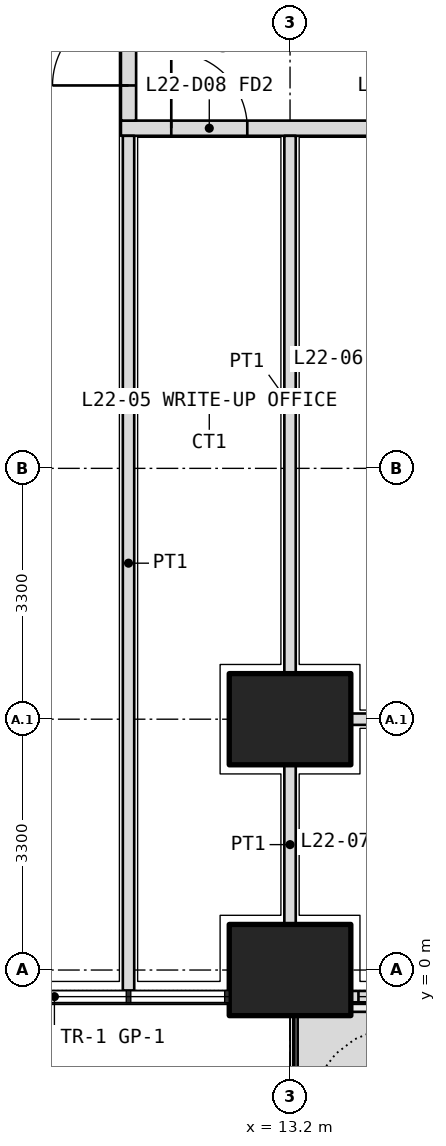
"""IFC4 building model, lengths in metres.
Left out: names, types, materials, properties, quantities, classifications, styles, units other than length and angle.
Written with IfcOpenShell. Run it as: python <this file> out.ifc"""

import sys

from ifc_helpers import new_model, si_unit, direction, frame, frame_2d, origin, origin_2d, place, context, subcontext, project, spatial, polyline, rectangle, outline, extrude, element, fill, save


model = new_model("IFC4")
c1 = context("Model", 3, precision=1e-05, world=origin(), true_north=direction((0.0, 1.0)))
c2 = subcontext(c1, "Body", "Model", "MODEL_VIEW")
j1 = project(units=[si_unit("LENGTHUNIT", "METRE"), si_unit("PLANEANGLEUNIT", "RADIAN")], contexts=[c1])
p1 = place(None, origin())
s1 = spatial("IfcSite", under=j1, at=p1, CompositionType="ELEMENT")
p2 = place(p1, origin())
s2 = spatial("IfcBuilding", under=s1, at=p2, CompositionType="ELEMENT")
p3 = place(p2, frame((0.0, 0.0, 99.0)))
s3 = spatial("IfcBuildingStorey", under=s2, at=p3, CompositionType="ELEMENT", Elevation=99.0)
for number, where, z_axis, x_axis in (
    (1, (13.2, 0.0, 0.0), (0.0, 0.0, 1.0), (1.0, 0.0, 0.0)),
    (2, (13.2, 3.3, 0.0), (0.0, 0.0, 1.0), (1.0, 0.0, 0.0)),
):
    element("IfcColumn", number, at=place(p3, frame(where, z_axis=z_axis, x_axis=x_axis)), inside=s3, PredefinedType="COLUMN", context=c2, shape_type="SweptSolid", body=[
        extrude(rectangle(XDim=1.6, YDim=1.2, at=origin_2d()), origin(), (0.0, 0.0, 1.0), 4.2),
    ])
p4 = place(p3, origin())
e3 = element("IfcWall", 3, at=p4, inside=s3, PredefinedType="USERDEFINED", context=c2, shape_type="SweptSolid", body=[
    extrude(outline(polyline([(13.3, -1.55), (15.75, -1.55), (15.75, -0.55), (13.3, -0.55), (13.3, -1.55)]), holes=[polyline([(13.45, -1.4), (15.6, -1.4), (15.6, -0.7), (13.45, -0.7), (13.45, -1.4)])]), origin(), (0.0, 0.0, 1.0), 1.05),
])
p5 = place(p3, frame((14.0, -0.35, 0.0), z_axis=(0.0, 0.0, 1.0), x_axis=(1.0, 0.0, 0.0)))
e4 = element("IfcWall", 4, at=p5, inside=s3, PredefinedType="SOLIDWALL", context=c2, shape_type="SweptSolid", body=[
    extrude(rectangle(XDim=5.0, YDim=0.15, at=frame_2d((2.5, 0.0))), origin(), (0.0, 0.0, 1.0), 2.7),
])
p6 = place(p5, frame((2.75, 0.0, 0.0)))
e5 = element("IfcOpeningElement", 5, at=p6, cuts=e4, PredefinedType="OPENING", context=c2, shape_type="SweptSolid", body=[
    extrude(rectangle(XDim=1.0, YDim=2.4, at=frame_2d((0.5, 1.2))), frame((0.0, 0.085, 0.0), z_axis=(0.0, -1.0, 0.0), x_axis=(1.0, 0.0, 0.0)), (0.0, 0.0, 1.0), 0.17),
])
p7 = place(p5, frame((0.1, 0.0, 0.1)))
e6 = element("IfcOpeningElement", 6, at=p7, cuts=e4, PredefinedType="OPENING", context=c2, shape_type="SweptSolid", body=[
    extrude(rectangle(XDim=2.15, YDim=2.3, at=frame_2d((1.075, 1.15))), frame((0.0, 0.085, 0.0), z_axis=(0.0, -1.0, 0.0), x_axis=(1.0, 0.0, 0.0)), (0.0, 0.0, 1.0), 0.17),
])
p8 = place(p5, frame((3.85, 0.0, 0.1)))
e7 = element("IfcOpeningElement", 7, at=p8, cuts=e4, PredefinedType="OPENING", context=c2, shape_type="SweptSolid", body=[
    extrude(rectangle(XDim=1.05, YDim=2.3, at=frame_2d((0.525, 1.15))), frame((0.0, 0.085, 0.0), z_axis=(0.0, -1.0, 0.0), x_axis=(1.0, 0.0, 0.0)), (0.0, 0.0, 1.0), 0.17),
])
p9 = place(p3, frame((10.975, 11.075, 0.0), z_axis=(0.0, 0.0, 1.0), x_axis=(1.0, 0.0, 0.0)))
e8 = element("IfcWall", 8, at=p9, inside=s3, PredefinedType="PARTITIONING", context=c2, shape_type="SweptSolid", body=[
    extrude(rectangle(XDim=30.85, YDim=0.2, at=frame_2d((15.425, 0.0))), origin(), (0.0, 0.0, 1.0), 2.85),
])
p10 = place(p9, frame((0.663, 0.0, 0.0)))
e9 = element("IfcOpeningElement", 9, at=p10, cuts=e8, PredefinedType="OPENING", context=c2, shape_type="SweptSolid", body=[
    extrude(rectangle(XDim=1.0, YDim=2.1, at=frame_2d((0.5, 1.05))), frame((0.0, 0.11, 0.0), z_axis=(0.0, -1.0, 0.0), x_axis=(1.0, 0.0, 0.0)), (0.0, 0.0, 1.0), 0.22),
])
p11 = place(p9, frame((3.275, 0.0, 0.0)))
e10 = element("IfcOpeningElement", 10, at=p11, cuts=e8, PredefinedType="OPENING", context=c2, shape_type="SweptSolid", body=[
    extrude(rectangle(XDim=1.2, YDim=2.1, at=frame_2d((0.6, 1.05))), frame((0.0, 0.11, 0.0), z_axis=(0.0, -1.0, 0.0), x_axis=(1.0, 0.0, 0.0)), (0.0, 0.0, 1.0), 0.22),
])
p12 = place(p9, frame((8.325, 0.0, 0.0)))
e11 = element("IfcOpeningElement", 11, at=p12, cuts=e8, PredefinedType="OPENING", context=c2, shape_type="SweptSolid", body=[
    extrude(rectangle(XDim=1.0, YDim=2.1, at=frame_2d((0.5, 1.05))), frame((0.0, 0.11, 0.0), z_axis=(0.0, -1.0, 0.0), x_axis=(1.0, 0.0, 0.0)), (0.0, 0.0, 1.0), 0.22),
])
p13 = place(p9, frame((13.275, 0.0, 0.0)))
e12 = element("IfcOpeningElement", 12, at=p13, cuts=e8, PredefinedType="OPENING", context=c2, shape_type="SweptSolid", body=[
    extrude(rectangle(XDim=1.0, YDim=2.1, at=frame_2d((0.5, 1.05))), frame((0.0, 0.11, 0.0), z_axis=(0.0, -1.0, 0.0), x_axis=(1.0, 0.0, 0.0)), (0.0, 0.0, 1.0), 0.22),
])
p14 = place(p9, frame((17.025, 0.0, 0.0)))
e13 = element("IfcOpeningElement", 13, at=p14, cuts=e8, PredefinedType="OPENING", context=c2, shape_type="SweptSolid", body=[
    extrude(rectangle(XDim=1.0, YDim=2.1, at=frame_2d((0.5, 1.05))), frame((0.0, 0.11, 0.0), z_axis=(0.0, -1.0, 0.0), x_axis=(1.0, 0.0, 0.0)), (0.0, 0.0, 1.0), 0.22),
])
p15 = place(p9, frame((20.325, 0.0, 0.0)))
e14 = element("IfcOpeningElement", 14, at=p15, cuts=e8, PredefinedType="OPENING", context=c2, shape_type="SweptSolid", body=[
    extrude(rectangle(XDim=1.0, YDim=2.1, at=frame_2d((0.5, 1.05))), frame((0.0, 0.11, 0.0), z_axis=(0.0, -1.0, 0.0), x_axis=(1.0, 0.0, 0.0)), (0.0, 0.0, 1.0), 0.22),
])
p16 = place(p9, frame((25.887, 0.0, 0.0)))
e15 = element("IfcOpeningElement", 15, at=p16, cuts=e8, PredefinedType="OPENING", context=c2, shape_type="SweptSolid", body=[
    extrude(rectangle(XDim=1.0, YDim=2.1, at=frame_2d((0.5, 1.05))), frame((0.0, 0.11, 0.0), z_axis=(0.0, -1.0, 0.0), x_axis=(1.0, 0.0, 0.0)), (0.0, 0.0, 1.0), 0.22),
])
p17 = place(p3, frame((11.075, 11.175, 0.0), z_axis=(0.0, 0.0, 1.0), x_axis=(0.0, 1.0, 0.0)))
e16 = element("IfcWall", 16, at=p17, inside=s3, PredefinedType="PARTITIONING", context=c2, shape_type="SweptSolid", body=[
    extrude(rectangle(XDim=27.625, YDim=0.2, at=frame_2d((13.812, 0.0))), origin(), (0.0, 0.0, 1.0), 2.85),
])
p18 = place(p17, frame((0.462, 0.0, 0.0)))
e17 = element("IfcOpeningElement", 17, at=p18, cuts=e16, PredefinedType="OPENING", context=c2, shape_type="SweptSolid", body=[
    extrude(rectangle(XDim=1.0, YDim=2.1, at=frame_2d((0.5, 1.05))), frame((0.0, 0.11, 0.0), z_axis=(0.0, -1.0, 0.0), x_axis=(1.0, 0.0, 0.0)), (0.0, 0.0, 1.0), 0.22),
])
p19 = place(p17, frame((2.575, 0.0, 0.0)))
e18 = element("IfcOpeningElement", 18, at=p19, cuts=e16, PredefinedType="OPENING", context=c2, shape_type="SweptSolid", body=[
    extrude(rectangle(XDim=1.0, YDim=2.1, at=frame_2d((0.5, 1.05))), frame((0.0, 0.11, 0.0), z_axis=(0.0, -1.0, 0.0), x_axis=(1.0, 0.0, 0.0)), (0.0, 0.0, 1.0), 0.22),
])
p20 = place(p17, frame((5.625, 0.0, 0.0)))
e19 = element("IfcOpeningElement", 19, at=p20, cuts=e16, PredefinedType="OPENING", context=c2, shape_type="SweptSolid", body=[
    extrude(rectangle(XDim=0.9, YDim=2.1, at=frame_2d((0.45, 1.05))), frame((0.0, 0.11, 0.0), z_axis=(0.0, -1.0, 0.0), x_axis=(1.0, 0.0, 0.0)), (0.0, 0.0, 1.0), 0.22),
])
p21 = place(p17, frame((9.425, 0.0, 0.0)))
e20 = element("IfcOpeningElement", 20, at=p21, cuts=e16, PredefinedType="OPENING", context=c2, shape_type="SweptSolid", body=[
    extrude(rectangle(XDim=0.9, YDim=2.1, at=frame_2d((0.45, 1.05))), frame((0.0, 0.11, 0.0), z_axis=(0.0, -1.0, 0.0), x_axis=(1.0, 0.0, 0.0)), (0.0, 0.0, 1.0), 0.22),
])
p22 = place(p17, frame((12.975, 0.0, 0.0)))
e21 = element("IfcOpeningElement", 21, at=p22, cuts=e16, PredefinedType="OPENING", context=c2, shape_type="SweptSolid", body=[
    extrude(rectangle(XDim=1.0, YDim=2.1, at=frame_2d((0.5, 1.05))), frame((0.0, 0.11, 0.0), z_axis=(0.0, -1.0, 0.0), x_axis=(1.0, 0.0, 0.0)), (0.0, 0.0, 1.0), 0.22),
])
p23 = place(p17, frame((20.975, 0.0, 0.0)))
e22 = element("IfcOpeningElement", 22, at=p23, cuts=e16, PredefinedType="OPENING", context=c2, shape_type="SweptSolid", body=[
    extrude(rectangle(XDim=1.0, YDim=2.1, at=frame_2d((0.5, 1.05))), frame((0.0, 0.11, 0.0), z_axis=(0.0, -1.0, 0.0), x_axis=(1.0, 0.0, 0.0)), (0.0, 0.0, 1.0), 0.22),
])
p24 = place(p3, frame((11.075, -0.27, 0.0), z_axis=(0.0, 0.0, 1.0), x_axis=(0.0, 1.0, 0.0)))
e23 = element("IfcWall", 23, at=p24, inside=s3, PredefinedType="PARTITIONING", context=c2, shape_type="SweptSolid", body=[
    extrude(rectangle(XDim=11.245, YDim=0.15, at=frame_2d((5.623, 0.0))), origin(), (0.0, 0.0, 1.0), 2.7),
])
p25 = place(p3, frame((14.0, 3.3, 0.0), z_axis=(0.0, 0.0, 1.0), x_axis=(1.0, 0.0, 0.0)))
e24 = element("IfcWall", 24, at=p25, inside=s3, PredefinedType="PARTITIONING", context=c2, shape_type="SweptSolid", body=[
    extrude(rectangle(XDim=5.0, YDim=0.15, at=frame_2d((2.5, 0.0))), origin(), (0.0, 0.0, 1.0), 3.9),
])
p26 = place(p25, frame((0.35, 0.0, 0.0)))
e25 = element("IfcOpeningElement", 25, at=p26, cuts=e24, PredefinedType="OPENING", context=c2, shape_type="SweptSolid", body=[
    extrude(rectangle(XDim=1.0, YDim=2.1, at=frame_2d((0.5, 1.05))), frame((0.0, 0.085, 0.0), z_axis=(0.0, -1.0, 0.0), x_axis=(1.0, 0.0, 0.0)), (0.0, 0.0, 1.0), 0.17),
])
p27 = place(p25, frame((3.75, 0.0, 0.0)))
e26 = element("IfcOpeningElement", 26, at=p27, cuts=e24, PredefinedType="OPENING", context=c2, shape_type="SweptSolid", body=[
    extrude(rectangle(XDim=1.0, YDim=2.1, at=frame_2d((0.5, 1.05))), frame((0.0, 0.085, 0.0), z_axis=(0.0, -1.0, 0.0), x_axis=(1.0, 0.0, 0.0)), (0.0, 0.0, 1.0), 0.17),
])
p28 = place(p3, frame((13.2, 0.6, 0.0), z_axis=(0.0, 0.0, 1.0), x_axis=(0.0, 1.0, 0.0)))
e27 = element("IfcWall", 27, at=p28, inside=s3, PredefinedType="PARTITIONING", context=c2, shape_type="SweptSolid", body=[
    extrude(rectangle(XDim=2.1, YDim=0.15, at=frame_2d((1.05, 0.0))), origin(), (0.0, 0.0, 1.0), 2.85),
])
p29 = place(p3, frame((13.2, 3.9, 0.0), z_axis=(0.0, 0.0, 1.0), x_axis=(0.0, 1.0, 0.0)))
e28 = element("IfcWall", 28, at=p29, inside=s3, PredefinedType="PARTITIONING", context=c2, shape_type="SweptSolid", body=[
    extrude(rectangle(XDim=7.075, YDim=0.15, at=frame_2d((3.538, 0.0))), origin(), (0.0, 0.0, 1.0), 2.85),
])
p30 = place(p7, origin())
e29 = element("IfcWindow", 29, at=p30, inside=s3, PartitioningType="SINGLE_PANEL", PredefinedType="WINDOW", context=c2, shape_type="SweptSolid", body=[
    extrude(rectangle(XDim=2.15, YDim=2.3, at=frame_2d((1.075, 1.15))), frame((0.0, 0.03, 0.0), z_axis=(0.0, -1.0, 0.0), x_axis=(1.0, 0.0, 0.0)), (0.0, 0.0, 1.0), 0.06),
])
fill(e6, e29)
p31 = place(p10, origin())
e30 = element("IfcDoor", 30, at=p31, inside=s3, OperationType="SINGLE_SWING_LEFT", PredefinedType="DOOR", context=c2, shape_type="SweptSolid", body=[
    extrude(rectangle(XDim=1.0, YDim=2.1, at=frame_2d((0.5, 1.05))), frame((0.0, 0.025, 0.0), z_axis=(0.0, -1.0, 0.0), x_axis=(1.0, 0.0, 0.0)), (0.0, 0.0, 1.0), 0.05),
])
fill(e9, e30)
p32 = place(p18, origin())
e31 = element("IfcDoor", 31, at=p32, inside=s3, OperationType="SINGLE_SWING_LEFT", PredefinedType="DOOR", context=c2, shape_type="SweptSolid", body=[
    extrude(rectangle(XDim=1.0, YDim=2.1, at=frame_2d((0.5, 1.05))), frame((0.0, 0.025, 0.0), z_axis=(0.0, -1.0, 0.0), x_axis=(1.0, 0.0, 0.0)), (0.0, 0.0, 1.0), 0.05),
])
fill(e17, e31)
save(model, sys.argv[1])
